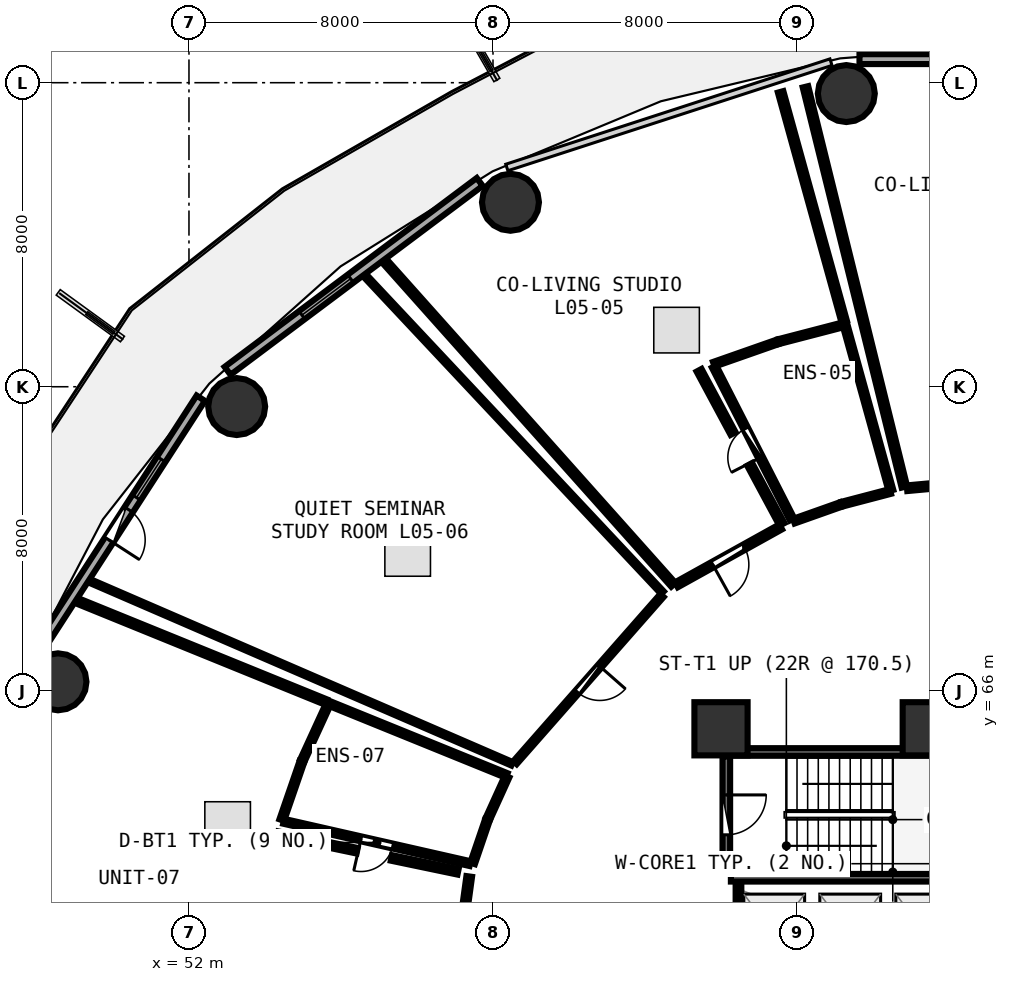
"""IFC4 building model, lengths in metres.
Left out: names, types, materials, properties, quantities, classifications, styles, units other than length and angle.
Written with IfcOpenShell. Run it as: python <this file> out.ifc"""

import sys

from ifc_helpers import new_model, si_unit, direction, frame, frame_2d, origin, origin_2d, place, context, subcontext, project, spatial, rectangle, circle, extrude, element, fill, save


model = new_model("IFC4")
c1 = context("Model", 3, precision=1e-05, world=origin(), true_north=direction((0.0, 1.0)))
c2 = subcontext(c1, "Body", "Model", "MODEL_VIEW")
j1 = project(units=[si_unit("LENGTHUNIT", "METRE"), si_unit("PLANEANGLEUNIT", "RADIAN")], contexts=[c1])
p1 = place(None, origin())
s1 = spatial("IfcSite", under=j1, at=p1, CompositionType="ELEMENT")
p2 = place(p1, origin())
s2 = spatial("IfcBuilding", under=s1, at=p2, CompositionType="ELEMENT")
p3 = place(p2, frame((0.0, 0.0, 22.5)))
s3 = spatial("IfcBuildingStorey", under=s2, at=p3, CompositionType="ELEMENT", Elevation=22.5)
for number, where, z_axis, x_axis in (
    (1, (71.48, 65.0, 0.0), (0.0, 0.0, 1.0), (1.0, 0.0, 0.0)),
    (2, (66.0, 65.0, 0.0), (0.0, 0.0, 1.0), (1.0, 0.0, 0.0)),
):
    element("IfcColumn", number, at=place(p3, frame(where, z_axis=z_axis, x_axis=x_axis)), inside=s3, PredefinedType="PILASTER", context=c2, shape_type="SweptSolid", body=[
        extrude(rectangle(XDim=1.4, YDim=1.4, at=origin_2d()), origin(), (0.0, 0.0, 1.0), 3.75),
    ])
for number, where, z_axis, x_axis in (
    (3, (69.298, 81.714, 0.0), (0.0, 0.0, 1.0), (1.0, 0.0, 0.0)),
    (4, (60.46, 78.854, 0.0), (0.0, 0.0, 1.0), (1.0, 0.0, 0.0)),
    (5, (53.256, 73.478, 0.0), (0.0, 0.0, 1.0), (1.0, 0.0, 0.0)),
    (6, (48.553, 66.236, 0.0), (0.0, 0.0, 1.0), (1.0, 0.0, 0.0)),
):
    element("IfcColumn", number, at=place(p3, frame(where, z_axis=z_axis, x_axis=x_axis)), inside=s3, PredefinedType="COLUMN", context=c2, shape_type="SweptSolid", body=[
        extrude(circle(Radius=0.75, at=origin_2d()), origin(), (0.0, 0.0, 1.0), 3.75),
    ])
p4 = place(p3, frame((78.356, 82.62, 0.0), z_axis=(0.0, 0.0, 1.0), x_axis=(-1.0, 0.0, 0.0)))
e7 = element("IfcWall", 7, at=p4, inside=s3, PredefinedType="SOLIDWALL", context=c2, shape_type="SweptSolid", body=[
    extrude(rectangle(XDim=8.712, YDim=0.26, at=frame_2d((4.356, 0.0))), origin(), (0.0, 0.0, 1.0), 3.475),
])
p5 = place(p4, frame((3.556, 0.0, 0.85)))
e8 = element("IfcOpeningElement", 8, at=p5, cuts=e7, PredefinedType="OPENING", context=c2, shape_type="SweptSolid", body=[
    extrude(rectangle(XDim=1.6, YDim=1.45, at=frame_2d((0.8, 0.725))), frame((0.0, 0.14, 0.0), z_axis=(0.0, -1.0, 0.0), x_axis=(1.0, 0.0, 0.0)), (0.0, 0.0, 1.0), 0.28),
])
p6 = place(p3, frame((59.651, 79.389, 0.0), z_axis=(0.0, 0.0, 1.0), x_axis=(-0.80030733173, -0.599590005569, 0.0)))
e9 = element("IfcWall", 9, at=p6, inside=s3, PredefinedType="SOLIDWALL", context=c2, shape_type="SweptSolid", body=[
    extrude(rectangle(XDim=8.291, YDim=0.26, at=frame_2d((4.145, 0.0))), origin(), (0.0, 0.0, 1.0), 3.475),
])
p7 = place(p6, frame((4.245, 0.0, 0.85)))
e10 = element("IfcOpeningElement", 10, at=p7, cuts=e9, PredefinedType="OPENING", context=c2, shape_type="SweptSolid", body=[
    extrude(rectangle(XDim=1.6, YDim=1.45, at=frame_2d((0.8, 0.725))), frame((0.0, 0.14, 0.0), z_axis=(0.0, -1.0, 0.0), x_axis=(1.0, 0.0, 0.0)), (0.0, 0.0, 1.0), 0.28),
])
p8 = place(p3, frame((52.311, 73.698, 0.0), z_axis=(0.0, 0.0, 1.0), x_axis=(-0.543005114258, -0.839729388488, 0.0)))
e11 = element("IfcWall", 11, at=p8, inside=s3, PredefinedType="SOLIDWALL", context=c2, shape_type="SweptSolid", body=[
    extrude(rectangle(XDim=7.938, YDim=0.26, at=frame_2d((3.969, 0.0))), origin(), (0.0, 0.0, 1.0), 3.475),
])
p9 = place(p8, frame((3.494, 0.0, 0.0)))
e12 = element("IfcOpeningElement", 12, at=p9, cuts=e11, PredefinedType="OPENING", context=c2, shape_type="SweptSolid", body=[
    extrude(rectangle(XDim=0.95, YDim=2.1, at=frame_2d((0.475, 1.05))), frame((0.0, 0.14, 0.0), z_axis=(0.0, -1.0, 0.0), x_axis=(1.0, 0.0, 0.0)), (0.0, 0.0, 1.0), 0.28),
])
p10 = place(p8, frame((1.914, 0.0, 0.85)))
e13 = element("IfcOpeningElement", 13, at=p10, cuts=e11, PredefinedType="OPENING", context=c2, shape_type="SweptSolid", body=[
    extrude(rectangle(XDim=1.2, YDim=1.45, at=frame_2d((0.6, 0.725))), frame((0.0, 0.14, 0.0), z_axis=(0.0, -1.0, 0.0), x_axis=(1.0, 0.0, 0.0)), (0.0, 0.0, 1.0), 0.28),
])
for number, where, z_axis, x_axis in (
    (14, (66.26, 61.08, 0.0), (0.0, 0.0, 1.0), (1.0, 0.0, 0.0)),
    (15, (73.42, 64.39, 0.0), (0.0, 0.0, 1.0), (-1.0, 0.0, 0.0)),
):
    element("IfcWall", number, at=place(p3, frame(where, z_axis=z_axis, x_axis=x_axis)), inside=s3, PredefinedType="SHEAR", context=c2, shape_type="SweptSolid", body=[
        extrude(rectangle(XDim=7.16, YDim=0.2, at=frame_2d((3.58, 0.0))), origin(), (0.0, 0.0, 1.0), 3.49),
    ])
p11 = place(p3, frame((66.14, 64.27, 0.0), z_axis=(0.0, 0.0, 1.0), x_axis=(0.0, -1.0, 0.0)))
e16 = element("IfcWall", 16, at=p11, inside=s3, PredefinedType="SHEAR", context=c2, shape_type="SweptSolid", body=[
    extrude(rectangle(XDim=3.07, YDim=0.2, at=frame_2d((1.535, 0.0))), origin(), (0.0, 0.0, 1.0), 3.49),
])
p12 = place(p11, frame((1.01, 0.0, 0.0)))
e17 = element("IfcOpeningElement", 17, at=p12, cuts=e16, PredefinedType="OPENING", context=c2, shape_type="SweptSolid", body=[
    extrude(rectangle(XDim=1.05, YDim=2.1, at=frame_2d((0.525, 1.05))), frame((0.0, 0.11, 0.0), z_axis=(0.0, -1.0, 0.0), x_axis=(1.0, 0.0, 0.0)), (0.0, 0.0, 1.0), 0.22),
])
p13 = place(p3, frame((66.46, 58.48, 0.0), z_axis=(0.0, 0.0, 1.0), x_axis=(0.0, 1.0, 0.0)))
e18 = element("IfcWall", 18, at=p13, inside=s3, PredefinedType="PARTITIONING", context=c2, shape_type="SweptSolid", body=[
    extrude(rectangle(XDim=2.46, YDim=0.15, at=frame_2d((1.23, 0.0))), origin(), (0.0, 0.0, 1.0), 3.48),
])
p14 = place(p3, frame((74.1, 71.624, 0.0), z_axis=(0.0, 0.0, 1.0), x_axis=(-0.995822031417, -0.091315287572, 0.0)))
e19 = element("IfcWall", 19, at=p14, inside=s3, PredefinedType="PARTITIONING", context=c2, shape_type="SweptSolid", body=[
    extrude(rectangle(XDim=3.219, YDim=0.15, at=frame_2d((1.609, 0.0))), origin(), (0.0, 0.0, 1.0), 3.235),
])
p15 = place(p14, frame((1.135, 0.0, 0.0)))
e20 = element("IfcOpeningElement", 20, at=p15, cuts=e19, PredefinedType="OPENING", context=c2, shape_type="SweptSolid", body=[
    extrude(rectangle(XDim=0.95, YDim=2.08, at=frame_2d((0.475, 1.04))), frame((0.0, 0.085, 0.0), z_axis=(0.0, -1.0, 0.0), x_axis=(1.0, 0.0, 0.0)), (0.0, 0.0, 1.0), 0.17),
])
p16 = place(p3, frame((67.87, 70.51, 0.0), z_axis=(0.0, 0.0, 1.0), x_axis=(-0.45442479933, 0.890785104138, 0.0)))
e21 = element("IfcWall", 21, at=p16, inside=s3, PredefinedType="PLUMBINGWALL", context=c2, shape_type="SweptSolid", body=[
    extrude(rectangle(XDim=4.514, YDim=0.13, at=frame_2d((2.257, 0.0))), origin(), (0.0, 0.0, 1.0), 3.175),
])
p17 = place(p16, frame((1.827, 0.0, 0.0)))
e22 = element("IfcOpeningElement", 22, at=p17, cuts=e21, PredefinedType="OPENING", context=c2, shape_type="SweptSolid", body=[
    extrude(rectangle(XDim=0.86, YDim=2.05, at=frame_2d((0.43, 1.025))), frame((0.0, 0.075, 0.0), z_axis=(0.0, -1.0, 0.0), x_axis=(1.0, 0.0, 0.0)), (0.0, 0.0, 1.0), 0.15),
])
p18 = place(p3, frame((67.571, 70.313, 0.0), z_axis=(0.0, 0.0, 1.0), x_axis=(-0.874179278891, -0.48560332408, 0.0)))
e23 = element("IfcWall", 23, at=p18, inside=s3, PredefinedType="PARTITIONING", context=c2, shape_type="SweptSolid", body=[
    extrude(rectangle(XDim=3.14, YDim=0.15, at=frame_2d((1.57, 0.0))), origin(), (0.0, 0.0, 1.0), 3.48),
])
p19 = place(p18, frame((1.095, 0.0, 0.0)))
e24 = element("IfcOpeningElement", 24, at=p19, cuts=e23, PredefinedType="OPENING", context=c2, shape_type="SweptSolid", body=[
    extrude(rectangle(XDim=0.95, YDim=2.08, at=frame_2d((0.475, 1.04))), frame((0.0, 0.085, 0.0), z_axis=(0.0, -1.0, 0.0), x_axis=(1.0, 0.0, 0.0)), (0.0, 0.0, 1.0), 0.17),
])
p20 = place(p3, frame((64.446, 68.507, 0.0), z_axis=(0.0, 0.0, 1.0), x_axis=(-0.660323401664, -0.75098136143, 0.0)))
e25 = element("IfcWall", 25, at=p20, inside=s3, PredefinedType="PARTITIONING", context=c2, shape_type="SweptSolid", body=[
    extrude(rectangle(XDim=5.857, YDim=0.12, at=frame_2d((2.929, 0.0))), origin(), (0.0, 0.0, 1.0), 2.875),
])
p21 = place(p20, frame((2.479, 0.0, 0.0)))
e26 = element("IfcOpeningElement", 26, at=p21, cuts=e25, PredefinedType="OPENING", context=c2, shape_type="SweptSolid", body=[
    extrude(rectangle(XDim=0.9, YDim=2.08, at=frame_2d((0.45, 1.04))), frame((0.0, 0.07, 0.0), z_axis=(0.0, -1.0, 0.0), x_axis=(1.0, 0.0, 0.0)), (0.0, 0.0, 1.0), 0.14),
])
p22 = place(p3, frame((59.397, 61.452, 0.0), z_axis=(0.0, 0.0, 1.0), x_axis=(-0.975187669184, 0.221379786503, 0.0)))
e27 = element("IfcWall", 27, at=p22, inside=s3, PredefinedType="PLUMBINGWALL", context=c2, shape_type="SweptSolid", body=[
    extrude(rectangle(XDim=5.029, YDim=0.13, at=frame_2d((2.514, 0.0))), origin(), (0.0, 0.0, 1.0), 3.175),
])
p23 = place(p22, frame((2.084, 0.0, 0.0)))
e28 = element("IfcOpeningElement", 28, at=p23, cuts=e27, PredefinedType="OPENING", context=c2, shape_type="SweptSolid", body=[
    extrude(rectangle(XDim=0.86, YDim=2.05, at=frame_2d((0.43, 1.025))), frame((0.0, 0.075, 0.0), z_axis=(0.0, -1.0, 0.0), x_axis=(1.0, 0.0, 0.0)), (0.0, 0.0, 1.0), 0.15),
])
p24 = place(p3, frame((59.375, 61.115, 0.0), z_axis=(0.0, 0.0, 1.0), x_axis=(-0.135838186105, -0.990731036758, 0.0)))
e29 = element("IfcWall", 29, at=p24, inside=s3, PredefinedType="PARTITIONING", context=c2, shape_type="SweptSolid", body=[
    extrude(rectangle(XDim=2.915, YDim=0.15, at=frame_2d((1.458, 0.0))), origin(), (0.0, 0.0, 1.0), 3.48),
])
p25 = place(p24, frame((0.983, 0.0, 0.0)))
e30 = element("IfcOpeningElement", 30, at=p25, cuts=e29, PredefinedType="OPENING", context=c2, shape_type="SweptSolid", body=[
    extrude(rectangle(XDim=0.95, YDim=2.08, at=frame_2d((0.475, 1.04))), frame((0.0, 0.085, 0.0), z_axis=(0.0, -1.0, 0.0), x_axis=(1.0, 0.0, 0.0)), (0.0, 0.0, 1.0), 0.17),
])
p26 = place(p3, frame((70.825, 71.363, 0.0), z_axis=(0.0, 0.0, 1.0), x_axis=(-0.239971369295, 0.970779965759, 0.0)))
e31 = element("IfcWall", 31, at=p26, inside=s3, PredefinedType="PARTITIONING", context=c2, shape_type="SweptSolid", body=[
    extrude(rectangle(XDim=10.846, YDim=0.15, at=frame_2d((5.423, 0.0))), origin(), (0.0, 0.0, 1.0), 2.875),
])
p27 = place(p3, frame((70.458, 71.245, 0.0), z_axis=(0.0, 0.0, 1.0), x_axis=(-0.967235526128, -0.253880753498, 0.0)))
e32 = element("IfcWall", 32, at=p27, inside=s3, PredefinedType="PLUMBINGWALL", context=c2, shape_type="SweptSolid", body=[
    extrude(rectangle(XDim=1.314, YDim=0.13, at=frame_2d((0.657, 0.0))), origin(), (0.0, 0.0, 1.0), 3.235),
])
p28 = place(p3, frame((69.148, 70.899, 0.0), z_axis=(0.0, 0.0, 1.0), x_axis=(-0.942537812533, -0.33409949408, 0.0)))
e33 = element("IfcWall", 33, at=p28, inside=s3, PredefinedType="PLUMBINGWALL", context=c2, shape_type="SweptSolid", body=[
    extrude(rectangle(XDim=1.307, YDim=0.13, at=frame_2d((0.654, 0.0))), origin(), (0.0, 0.0, 1.0), 3.48),
])
p29 = place(p3, frame((65.81, 74.591, 0.0), z_axis=(0.0, 0.0, 1.0), x_axis=(0.943615101484, 0.331044619728, 0.0)))
e34 = element("IfcWall", 34, at=p29, inside=s3, PredefinedType="PLUMBINGWALL", context=c2, shape_type="SweptSolid", body=[
    extrude(rectangle(XDim=1.77, YDim=0.13, at=frame_2d((0.885, 0.0))), origin(), (0.0, 0.0, 1.0), 3.48),
])
p30 = place(p3, frame((67.518, 75.188, 0.0), z_axis=(0.0, 0.0, 1.0), x_axis=(0.967790422801, 0.251757219427, 0.0)))
e35 = element("IfcWall", 35, at=p30, inside=s3, PredefinedType="PLUMBINGWALL", context=c2, shape_type="SweptSolid", body=[
    extrude(rectangle(XDim=1.78, YDim=0.13, at=frame_2d((0.89, 0.0))), origin(), (0.0, 0.0, 1.0), 3.48),
])
p31 = place(p3, frame((69.265, 75.622, 0.0), z_axis=(0.0, 0.0, 1.0), x_axis=(0.267094578575, -0.963670320232, 0.0)))
e36 = element("IfcWall", 36, at=p31, inside=s3, PredefinedType="PLUMBINGWALL", context=c2, shape_type="SweptSolid", body=[
    extrude(rectangle(XDim=4.516, YDim=0.13, at=frame_2d((2.258, 0.0))), origin(), (0.0, 0.0, 1.0), 2.875),
])
p32 = place(p3, frame((64.746, 68.789, 0.0), z_axis=(0.0, 0.0, 1.0), x_axis=(-0.66580890104, 0.746122313897, 0.0)))
e37 = element("IfcWall", 37, at=p32, inside=s3, PredefinedType="PARTITIONING", context=c2, shape_type="SweptSolid", body=[
    extrude(rectangle(XDim=11.399, YDim=0.15, at=frame_2d((5.7, 0.0))), origin(), (0.0, 0.0, 1.0), 2.875),
])
p33 = place(p3, frame((67.569, 81.76, 0.0), z_axis=(0.0, 0.0, 1.0), x_axis=(0.266691519666, -0.963781942837, 0.0)))
e38 = element("IfcWall", 38, at=p33, inside=s3, PredefinedType="PARTITIONING", context=c2, shape_type="SweptSolid", body=[
    extrude(rectangle(XDim=6.268, YDim=0.15, at=frame_2d((3.134, 0.0))), origin(), (0.0, 0.0, 1.0), 2.875),
])
p34 = place(p3, frame((65.423, 74.434, 0.0), z_axis=(0.0, 0.0, 1.0), x_axis=(0.473660949034, -0.880707275637, 0.0)))
e39 = element("IfcWall", 39, at=p34, inside=s3, PredefinedType="PARTITIONING", context=c2, shape_type="SweptSolid", body=[
    extrude(rectangle(XDim=1.891, YDim=0.15, at=frame_2d((0.946, 0.0))), origin(), (0.0, 0.0, 1.0), 3.175),
])
p35 = place(p3, frame((66.754, 71.958, 0.0), z_axis=(0.0, 0.0, 1.0), x_axis=(0.473466863657, -0.880811630838, 0.0)))
e40 = element("IfcWall", 40, at=p35, inside=s3, PredefinedType="PARTITIONING", context=c2, shape_type="SweptSolid", body=[
    extrude(rectangle(XDim=1.794, YDim=0.15, at=frame_2d((0.897, 0.0))), origin(), (0.0, 0.0, 1.0), 3.235),
])
p36 = place(p3, frame((60.502, 64.079, 0.0), z_axis=(0.0, 0.0, 1.0), x_axis=(-0.917695041134, 0.397285554077, 0.0)))
e41 = element("IfcWall", 41, at=p36, inside=s3, PredefinedType="PARTITIONING", context=c2, shape_type="SweptSolid", body=[
    extrude(rectangle(XDim=12.07, YDim=0.1, at=frame_2d((6.035, 0.0))), origin(), (0.0, 0.0, 1.0), 2.875),
])
p37 = place(p3, frame((56.632, 76.922, 0.0), z_axis=(0.0, 0.0, 1.0), x_axis=(0.684261294523, -0.729236916796, 0.0)))
e42 = element("IfcWall", 42, at=p37, inside=s3, PredefinedType="PARTITIONING", context=c2, shape_type="SweptSolid", body=[
    extrude(rectangle(XDim=11.438, YDim=0.1, at=frame_2d((5.719, 0.0))), origin(), (0.0, 0.0, 1.0), 2.875),
])
p38 = place(p3, frame((60.372, 63.745, 0.0), z_axis=(0.0, 0.0, 1.0), x_axis=(-0.4138937247, -0.910325208183, 0.0)))
e43 = element("IfcWall", 43, at=p38, inside=s3, PredefinedType="PLUMBINGWALL", context=c2, shape_type="SweptSolid", body=[
    extrude(rectangle(XDim=1.216, YDim=0.13, at=frame_2d((0.608, 0.0))), origin(), (0.0, 0.0, 1.0), 3.48),
])
p39 = place(p3, frame((59.854, 62.601, 0.0), z_axis=(0.0, 0.0, 1.0), x_axis=(-0.323735286305, -0.946147696928, 0.0)))
e44 = element("IfcWall", 44, at=p39, inside=s3, PredefinedType="PLUMBINGWALL", context=c2, shape_type="SweptSolid", body=[
    extrude(rectangle(XDim=1.208, YDim=0.13, at=frame_2d((0.604, 0.0))), origin(), (0.0, 0.0, 1.0), 3.48),
])
p40 = place(p3, frame((54.441, 62.598, 0.0), z_axis=(0.0, 0.0, 1.0), x_axis=(0.326356647952, 0.945246707657, 0.0)))
e45 = element("IfcWall", 45, at=p40, inside=s3, PredefinedType="PLUMBINGWALL", context=c2, shape_type="SweptSolid", body=[
    extrude(rectangle(XDim=1.624, YDim=0.13, at=frame_2d((0.812, 0.0))), origin(), (0.0, 0.0, 1.0), 3.48),
])
p41 = place(p3, frame((54.986, 64.17, 0.0), z_axis=(0.0, 0.0, 1.0), x_axis=(0.41762687648, 0.908618617486, 0.0)))
e46 = element("IfcWall", 46, at=p41, inside=s3, PredefinedType="PLUMBINGWALL", context=c2, shape_type="SweptSolid", body=[
    extrude(rectangle(XDim=1.634, YDim=0.13, at=frame_2d((0.817, 0.0))), origin(), (0.0, 0.0, 1.0), 2.875),
])
p42 = place(p3, frame((55.696, 65.666, 0.0), z_axis=(0.0, 0.0, 1.0), x_axis=(0.926504606816, -0.376283421835, 0.0)))
e47 = element("IfcWall", 47, at=p42, inside=s3, PredefinedType="PLUMBINGWALL", context=c2, shape_type="SweptSolid", body=[
    extrude(rectangle(XDim=5.036, YDim=0.13, at=frame_2d((2.518, 0.0))), origin(), (0.0, 0.0, 1.0), 2.875),
])
p43 = place(p3, frame((49.135, 68.336, 0.0), z_axis=(0.0, 0.0, 1.0), x_axis=(0.926325178802, -0.376724917038, 0.0)))
e48 = element("IfcWall", 48, at=p43, inside=s3, PredefinedType="PARTITIONING", context=c2, shape_type="SweptSolid", body=[
    extrude(rectangle(XDim=6.983, YDim=0.15, at=frame_2d((3.492, 0.0))), origin(), (0.0, 0.0, 1.0), 2.875),
])
p44 = place(p3, frame((54.337, 62.227, 0.0), z_axis=(0.0, 0.0, 1.0), x_axis=(0.978922282622, -0.204233113343, 0.0)))
e49 = element("IfcWall", 49, at=p44, inside=s3, PredefinedType="PARTITIONING", context=c2, shape_type="SweptSolid", body=[
    extrude(rectangle(XDim=2.133, YDim=0.15, at=frame_2d((1.066, 0.0))), origin(), (0.0, 0.0, 1.0), 3.175),
])
p45 = place(p3, frame((57.325, 61.603, 0.0), z_axis=(0.0, 0.0, 1.0), x_axis=(0.978929424395, -0.204198878681, 0.0)))
e50 = element("IfcWall", 50, at=p45, inside=s3, PredefinedType="PARTITIONING", context=c2, shape_type="SweptSolid", body=[
    extrude(rectangle(XDim=1.793, YDim=0.15, at=frame_2d((0.897, 0.0))), origin(), (0.0, 0.0, 1.0), 3.235),
])
p46 = place(p7, origin())
e51 = element("IfcWindow", 51, at=p46, inside=s3, PartitioningType="SINGLE_PANEL", PredefinedType="WINDOW", context=c2, shape_type="SweptSolid", body=[
    extrude(rectangle(XDim=1.6, YDim=1.45, at=frame_2d((0.8, 0.725))), frame((0.0, 0.03, 0.0), z_axis=(0.0, -1.0, 0.0), x_axis=(1.0, 0.0, 0.0)), (0.0, 0.0, 1.0), 0.06),
])
fill(e10, e51)
p47 = place(p9, frame((0.95, 0.0, 0.0), z_axis=(0.0, 0.0, 1.0), x_axis=(-1.0, 0.0, 0.0)))
e52 = element("IfcDoor", 52, at=p47, inside=s3, OperationType="SINGLE_SWING_LEFT", PredefinedType="DOOR", context=c2, shape_type="SweptSolid", body=[
    extrude(rectangle(XDim=0.95, YDim=2.1, at=frame_2d((0.475, 1.05))), frame((0.0, 0.025, 0.0), z_axis=(0.0, -1.0, 0.0), x_axis=(1.0, 0.0, 0.0)), (0.0, 0.0, 1.0), 0.05),
])
fill(e12, e52)
p48 = place(p10, origin())
e53 = element("IfcWindow", 53, at=p48, inside=s3, PartitioningType="SINGLE_PANEL", PredefinedType="WINDOW", context=c2, shape_type="SweptSolid", body=[
    extrude(rectangle(XDim=1.2, YDim=1.45, at=frame_2d((0.6, 0.725))), frame((0.0, 0.03, 0.0), z_axis=(0.0, -1.0, 0.0), x_axis=(1.0, 0.0, 0.0)), (0.0, 0.0, 1.0), 0.06),
])
fill(e13, e53)
p49 = place(p12, origin())
e54 = element("IfcDoor", 54, at=p49, inside=s3, OperationType="SINGLE_SWING_LEFT", PredefinedType="DOOR", context=c2, shape_type="SweptSolid", body=[
    extrude(rectangle(XDim=1.05, YDim=2.1, at=frame_2d((0.525, 1.05))), frame((0.0, 0.025, 0.0), z_axis=(0.0, -1.0, 0.0), x_axis=(1.0, 0.0, 0.0)), (0.0, 0.0, 1.0), 0.05),
])
fill(e17, e54)
p50 = place(p17, origin())
e55 = element("IfcDoor", 55, at=p50, inside=s3, OperationType="SINGLE_SWING_LEFT", PredefinedType="DOOR", context=c2, shape_type="SweptSolid", body=[
    extrude(rectangle(XDim=0.86, YDim=2.05, at=frame_2d((0.43, 1.025))), frame((0.0, 0.025, 0.0), z_axis=(0.0, -1.0, 0.0), x_axis=(1.0, 0.0, 0.0)), (0.0, 0.0, 1.0), 0.05),
])
fill(e22, e55)
p51 = place(p19, origin())
e56 = element("IfcDoor", 56, at=p51, inside=s3, OperationType="SINGLE_SWING_RIGHT", PredefinedType="DOOR", context=c2, shape_type="SweptSolid", body=[
    extrude(rectangle(XDim=0.95, YDim=2.08, at=frame_2d((0.475, 1.04))), frame((0.0, 0.025, 0.0), z_axis=(0.0, -1.0, 0.0), x_axis=(1.0, 0.0, 0.0)), (0.0, 0.0, 1.0), 0.05),
])
fill(e24, e56)
p52 = place(p21, origin())
e57 = element("IfcDoor", 57, at=p52, inside=s3, OperationType="SINGLE_SWING_LEFT", PredefinedType="DOOR", context=c2, shape_type="SweptSolid", body=[
    extrude(rectangle(XDim=0.9, YDim=2.08, at=frame_2d((0.45, 1.04))), frame((0.0, 0.025, 0.0), z_axis=(0.0, -1.0, 0.0), x_axis=(1.0, 0.0, 0.0)), (0.0, 0.0, 1.0), 0.05),
])
fill(e26, e57)
p53 = place(p23, origin())
e58 = element("IfcDoor", 58, at=p53, inside=s3, OperationType="SINGLE_SWING_RIGHT", PredefinedType="DOOR", context=c2, shape_type="SweptSolid", body=[
    extrude(rectangle(XDim=0.86, YDim=2.05, at=frame_2d((0.43, 1.025))), frame((0.0, 0.025, 0.0), z_axis=(0.0, -1.0, 0.0), x_axis=(1.0, 0.0, 0.0)), (0.0, 0.0, 1.0), 0.05),
])
fill(e28, e58)
save(model, sys.argv[1])
